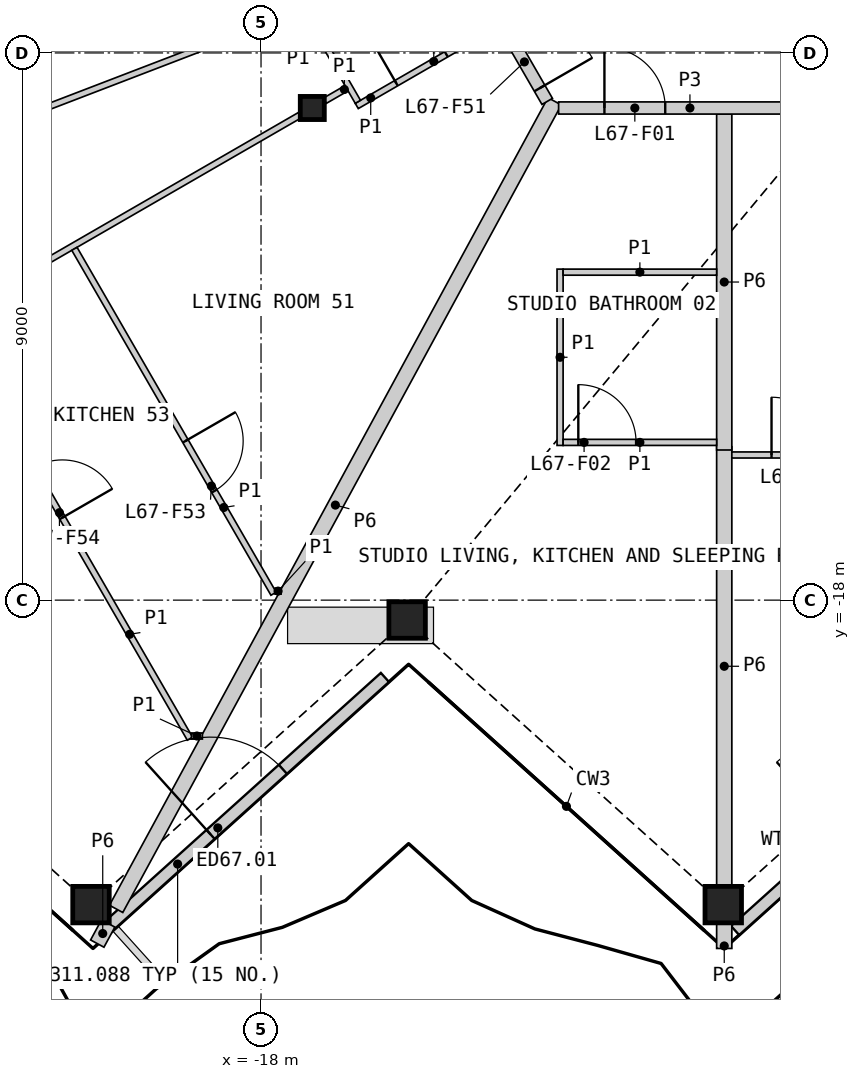
"""IFC4 building model, lengths in metres.
Left out: names, types, materials, properties, quantities, classifications, styles, units other than length and angle.
Written with IfcOpenShell. Run it as: python <this file> out.ifc"""

import sys

from ifc_helpers import new_model, si_unit, direction, frame, frame_2d, origin, origin_2d, place, context, subcontext, project, spatial, rectangle, hollow_rectangle, i_section, extrude, element, fill, save


model = new_model("IFC4")
c1 = context("Model", 3, precision=1e-05, world=origin(), true_north=direction((0.0, 1.0)))
c2 = subcontext(c1, "Body", "Model", "MODEL_VIEW")
j1 = project(units=[si_unit("LENGTHUNIT", "METRE"), si_unit("PLANEANGLEUNIT", "RADIAN")], contexts=[c1])
p1 = place(None, origin())
s1 = spatial("IfcSite", under=j1, at=p1, CompositionType="ELEMENT")
p2 = place(p1, origin())
s2 = spatial("IfcBuilding", under=s1, at=p2, CompositionType="ELEMENT")
p3 = place(p2, frame((0.0, 0.0, 308.6)))
s3 = spatial("IfcBuildingStorey", under=s2, at=p3, CompositionType="ELEMENT", Elevation=308.6)
for number, where, z_axis, x_axis in (
    (1, (-20.796, -23.008, 0.0), (0.0, 0.0, 1.0), (1.0, 0.0, 0.0)),
    (2, (-15.597, -18.327, 0.0), (0.0, 0.0, 1.0), (1.0, 0.0, 0.0)),
    (3, (-10.398, -23.008, 0.0), (0.0, 0.0, 1.0), (1.0, 0.0, 0.0)),
):
    element("IfcColumn", number, at=place(p3, frame(where, z_axis=z_axis, x_axis=x_axis)), inside=s3, PredefinedType="COLUMN", context=c2, shape_type="SweptSolid", body=[
        extrude(hollow_rectangle(XDim=0.6, YDim=0.6, WallThickness=0.04, at=origin_2d()), origin(), (0.0, 0.0, 1.0), 3.4),
    ])
p4 = place(p3, frame((-17.157, -9.906, 0.0), z_axis=(0.0, 0.0, 1.0), x_axis=(1.0, 0.0, 0.0)))
e4 = element("IfcColumn", 4, at=p4, inside=s3, PredefinedType="COLUMN", context=c2, shape_type="SweptSolid", body=[
    extrude(i_section(OverallWidth=0.396, OverallDepth=0.381, WebThickness=0.019, FlangeThickness=0.03, at=origin_2d()), origin(), (0.0, 0.0, 1.0), 3.4),
])
p5 = place(p3, frame((-20.508, -23.364, 0.0), z_axis=(0.0, 0.0, 1.0), x_axis=(0.743135364919, 0.669141113224, 0.0)))
e5 = element("IfcWall", 5, at=p5, inside=s3, PredefinedType="SOLIDWALL", context=c2, shape_type="SweptSolid", body=[
    extrude(rectangle(XDim=6.117, YDim=0.2, at=frame_2d((3.059, 0.0))), origin(), (0.0, 0.0, 1.0), 2.488),
])
p6 = place(p5, frame((2.259, 0.0, 0.0)))
e6 = element("IfcOpeningElement", 6, at=p6, cuts=e5, PredefinedType="OPENING", context=c2, shape_type="SweptSolid", body=[
    extrude(rectangle(XDim=1.6, YDim=2.25, at=frame_2d((0.8, 1.125))), frame((0.0, 0.11, 0.0), z_axis=(0.0, -1.0, 0.0), x_axis=(1.0, 0.0, 0.0)), (0.0, 0.0, 1.0), 0.22),
])
p7 = place(p3, frame((-10.203, -23.434, 0.0), z_axis=(0.0, 0.0, 1.0), x_axis=(0.74314582041, 0.669129501373, 0.0)))
e7 = element("IfcWall", 7, at=p7, inside=s3, PredefinedType="SOLIDWALL", context=c2, shape_type="SweptSolid", body=[
    extrude(rectangle(XDim=6.221, YDim=0.2, at=frame_2d((3.11, 0.0))), origin(), (0.0, 0.0, 1.0), 2.488),
])
p8 = place(p7, frame((2.362, 0.0, 0.0)))
e8 = element("IfcOpeningElement", 8, at=p8, cuts=e7, PredefinedType="OPENING", context=c2, shape_type="SweptSolid", body=[
    extrude(rectangle(XDim=1.6, YDim=2.25, at=frame_2d((0.8, 1.125))), frame((0.0, 0.11, 0.0), z_axis=(0.0, -1.0, 0.0), x_axis=(1.0, 0.0, 0.0)), (0.0, 0.0, 1.0), 0.22),
])
p9 = place(p3, frame((-20.383, -23.078, 0.0), z_axis=(0.0, 0.0, 1.0), x_axis=(0.477177412766, 0.878806984921, 0.0)))
e9 = element("IfcWall", 9, at=p9, inside=s3, PredefinedType="PARTITIONING", context=c2, shape_type="SweptSolid", body=[
    extrude(rectangle(XDim=15.114, YDim=0.25, at=frame_2d((7.557, 0.0))), origin(), (0.0, 0.0, 1.0), 2.33),
])
p10 = place(p3, frame((-10.382, -22.698, 0.0), z_axis=(0.0, 0.0, 1.0), x_axis=(0.0, 1.0, 0.0)))
e10 = element("IfcWall", 10, at=p10, inside=s3, PredefinedType="PARTITIONING", context=c2, shape_type="SweptSolid", body=[
    extrude(rectangle(XDim=7.22, YDim=0.25, at=frame_2d((3.61, 0.0))), origin(), (0.0, 0.0, 1.0), 2.33),
])
p11 = place(p3, frame((-10.382, -15.531, 0.0), z_axis=(0.0, 0.0, 1.0), x_axis=(0.0, 1.0, 0.0)))
e11 = element("IfcWall", 11, at=p11, inside=s3, PredefinedType="PARTITIONING", context=c2, shape_type="SweptSolid", body=[
    extrude(rectangle(XDim=5.525, YDim=0.25, at=frame_2d((2.762, 0.0))), origin(), (0.0, 0.0, 1.0), 2.33),
])
p12 = place(p3, frame((-13.106, -9.906, 0.0), z_axis=(0.0, 0.0, 1.0), x_axis=(1.0, 0.0, 0.0)))
e12 = element("IfcWall", 12, at=p12, inside=s3, PredefinedType="PARTITIONING", context=c2, shape_type="SweptSolid", body=[
    extrude(rectangle(XDim=4.32, YDim=0.2, at=frame_2d((2.16, 0.0))), origin(), (0.0, 0.0, 1.0), 3.1),
])
p13 = place(p12, frame((0.753, 0.0, 0.0)))
e13 = element("IfcOpeningElement", 13, at=p13, cuts=e12, PredefinedType="OPENING", context=c2, shape_type="SweptSolid", body=[
    extrude(rectangle(XDim=1.0, YDim=2.1, at=frame_2d((0.5, 1.05))), frame((0.0, 0.11, 0.0), z_axis=(0.0, -1.0, 0.0), x_axis=(1.0, 0.0, 0.0)), (0.0, 0.0, 1.0), 0.22),
])
p14 = place(p3, frame((-15.131, -6.614, 0.0), z_axis=(0.0, 0.0, 1.0), x_axis=(0.499967746641, -0.866044024469, 0.0)))
e14 = element("IfcWall", 14, at=p14, inside=s3, PredefinedType="PARTITIONING", context=c2, shape_type="SweptSolid", body=[
    extrude(rectangle(XDim=3.676, YDim=0.2, at=frame_2d((1.838, 0.0))), origin(), (0.0, 0.0, 1.0), 3.1),
])
p15 = place(p14, frame((2.426, 0.0, 0.0)))
e15 = element("IfcOpeningElement", 15, at=p15, cuts=e14, PredefinedType="OPENING", context=c2, shape_type="SweptSolid", body=[
    extrude(rectangle(XDim=1.0, YDim=2.1, at=frame_2d((0.5, 1.05))), frame((0.0, 0.11, 0.0), z_axis=(0.0, -1.0, 0.0), x_axis=(1.0, 0.0, 0.0)), (0.0, 0.0, 1.0), 0.22),
])
p16 = place(p3, frame((-10.382, -23.729, 0.0), z_axis=(0.0, 0.0, 1.0), x_axis=(0.0, 1.0, 0.0)))
e16 = element("IfcWall", 16, at=p16, inside=s3, PredefinedType="PARTITIONING", context=c2, shape_type="SweptSolid", body=[
    extrude(rectangle(XDim=0.411, YDim=0.25, at=frame_2d((0.206, 0.0))), origin(), (0.0, 0.0, 1.0), 2.33),
])
p17 = place(p3, frame((-20.693, -23.649, 0.0), z_axis=(0.0, 0.0, 1.0), x_axis=(0.477077538769, 0.878861207474, 0.0)))
e17 = element("IfcWall", 17, at=p17, inside=s3, PredefinedType="PARTITIONING", context=c2, shape_type="SweptSolid", body=[
    extrude(rectangle(XDim=0.376, YDim=0.25, at=frame_2d((0.188, 0.0))), origin(), (0.0, 0.0, 1.0), 2.33),
])
p18 = place(p3, frame((-29.479, -12.95, 0.0), z_axis=(0.0, 0.0, 1.0), x_axis=(0.933581523131, 0.358365092703, 0.0)))
e18 = element("IfcWall", 18, at=p18, inside=s3, PredefinedType="PARTITIONING", context=c2, shape_type="SweptSolid", body=[
    extrude(rectangle(XDim=13.005, YDim=0.1, at=frame_2d((6.502, 0.0))), origin(), (0.0, 0.0, 1.0), 2.33),
])
p19 = place(p18, frame((4.771, 0.0, 0.0)))
e19 = element("IfcOpeningElement", 19, at=p19, cuts=e18, PredefinedType="OPENING", context=c2, shape_type="SweptSolid", body=[
    extrude(rectangle(XDim=0.95, YDim=2.1, at=frame_2d((0.475, 1.05))), frame((0.0, 0.06, 0.0), z_axis=(0.0, -1.0, 0.0), x_axis=(1.0, 0.0, 0.0)), (0.0, 0.0, 1.0), 0.12),
])
p20 = place(p3, frame((-27.122, -15.659, 0.0), z_axis=(0.0, 0.0, 1.0), x_axis=(0.866021046153, 0.500007547564, 0.0)))
e20 = element("IfcWall", 20, at=p20, inside=s3, PredefinedType="PARTITIONING", context=c2, shape_type="SweptSolid", body=[
    extrude(rectangle(XDim=11.267, YDim=0.1, at=frame_2d((5.634, 0.0))), origin(), (0.0, 0.0, 1.0), 2.33),
])
p21 = place(p20, frame((1.452, 0.0, 0.0)))
e21 = element("IfcOpeningElement", 21, at=p21, cuts=e20, PredefinedType="OPENING", context=c2, shape_type="SweptSolid", body=[
    extrude(rectangle(XDim=0.95, YDim=2.1, at=frame_2d((0.475, 1.05))), frame((0.0, 0.06, 0.0), z_axis=(0.0, -1.0, 0.0), x_axis=(1.0, 0.0, 0.0)), (0.0, 0.0, 1.0), 0.12),
])
p22 = place(p3, frame((-10.257, -15.613, 0.0), z_axis=(0.0, 0.0, 1.0), x_axis=(1.0, 0.0, 0.0)))
e22 = element("IfcWall", 22, at=p22, inside=s3, PredefinedType="PARTITIONING", context=c2, shape_type="SweptSolid", body=[
    extrude(rectangle(XDim=10.207, YDim=0.1, at=frame_2d((5.104, 0.0))), origin(), (0.0, 0.0, 1.0), 2.33),
])
p23 = place(p22, frame((8.403, 0.0, 0.0)))
e23 = element("IfcOpeningElement", 23, at=p23, cuts=e22, PredefinedType="OPENING", context=c2, shape_type="SweptSolid", body=[
    extrude(rectangle(XDim=0.95, YDim=2.1, at=frame_2d((0.475, 1.05))), frame((0.0, 0.06, 0.0), z_axis=(0.0, -1.0, 0.0), x_axis=(1.0, 0.0, 0.0)), (0.0, 0.0, 1.0), 0.12),
])
p24 = place(p22, frame((0.653, 0.0, 0.0)))
e24 = element("IfcOpeningElement", 24, at=p24, cuts=e22, PredefinedType="OPENING", context=c2, shape_type="SweptSolid", body=[
    extrude(rectangle(XDim=0.95, YDim=2.1, at=frame_2d((0.475, 1.05))), frame((0.0, 0.06, 0.0), z_axis=(0.0, -1.0, 0.0), x_axis=(1.0, 0.0, 0.0)), (0.0, 0.0, 1.0), 0.12),
])
p25 = place(p3, frame((-23.133, -13.414, 0.0), z_axis=(0.0, 0.0, 1.0), x_axis=(0.500014841469, -0.866016834889, 0.0)))
e25 = element("IfcWall", 25, at=p25, inside=s3, PredefinedType="PARTITIONING", context=c2, shape_type="SweptSolid", body=[
    extrude(rectangle(XDim=7.927, YDim=0.1, at=frame_2d((3.963, 0.0))), origin(), (0.0, 0.0, 1.0), 2.33),
])
p26 = place(p25, frame((2.78, 0.0, 0.0)))
e26 = element("IfcOpeningElement", 26, at=p26, cuts=e25, PredefinedType="OPENING", context=c2, shape_type="SweptSolid", body=[
    extrude(rectangle(XDim=0.95, YDim=2.1, at=frame_2d((0.475, 1.05))), frame((0.0, 0.06, 0.0), z_axis=(0.0, -1.0, 0.0), x_axis=(1.0, 0.0, 0.0)), (0.0, 0.0, 1.0), 0.12),
])
p27 = place(p3, frame((-21.069, -12.222, 0.0), z_axis=(0.0, 0.0, 1.0), x_axis=(0.499991310556, -0.866030420579, 0.0)))
e27 = element("IfcWall", 27, at=p27, inside=s3, PredefinedType="PARTITIONING", context=c2, shape_type="SweptSolid", body=[
    extrude(rectangle(XDim=6.55, YDim=0.1, at=frame_2d((3.275, 0.0))), origin(), (0.0, 0.0, 1.0), 2.33),
])
p28 = place(p27, frame((3.65, 0.0, 0.0)))
e28 = element("IfcOpeningElement", 28, at=p28, cuts=e27, PredefinedType="OPENING", context=c2, shape_type="SweptSolid", body=[
    extrude(rectangle(XDim=0.95, YDim=2.1, at=frame_2d((0.475, 1.05))), frame((0.0, 0.06, 0.0), z_axis=(0.0, -1.0, 0.0), x_axis=(1.0, 0.0, 0.0)), (0.0, 0.0, 1.0), 0.12),
])
p29 = place(p3, frame((-13.082, -15.456, 0.0), z_axis=(0.0, 0.0, 1.0), x_axis=(0.0, 1.0, 0.0)))
e29 = element("IfcWall", 29, at=p29, inside=s3, PredefinedType="PARTITIONING", context=c2, shape_type="SweptSolid", body=[
    extrude(rectangle(XDim=2.9, YDim=0.1, at=frame_2d((1.45, 0.0))), origin(), (0.0, 0.0, 1.0), 2.33),
])
p30 = place(p3, frame((-16.426, -9.872, 0.0), z_axis=(0.0, 0.0, 1.0), x_axis=(0.866029095148, 0.499993606316, 0.0)))
e30 = element("IfcWall", 30, at=p30, inside=s3, PredefinedType="PARTITIONING", context=c2, shape_type="SweptSolid", body=[
    extrude(rectangle(XDim=2.65, YDim=0.1, at=frame_2d((1.325, 0.0))), origin(), (0.0, 0.0, 1.0), 2.33),
])
p31 = place(p30, frame((0.75, 0.0, 0.0)))
e31 = element("IfcOpeningElement", 31, at=p31, cuts=e30, PredefinedType="OPENING", context=c2, shape_type="SweptSolid", body=[
    extrude(rectangle(XDim=0.95, YDim=2.1, at=frame_2d((0.475, 1.05))), frame((0.0, 0.06, 0.0), z_axis=(0.0, -1.0, 0.0), x_axis=(1.0, 0.0, 0.0)), (0.0, 0.0, 1.0), 0.12),
])
p32 = place(p3, frame((-13.032, -12.606, 0.0), z_axis=(0.0, 0.0, 1.0), x_axis=(1.0, 0.0, 0.0)))
e32 = element("IfcWall", 32, at=p32, inside=s3, PredefinedType="PARTITIONING", context=c2, shape_type="SweptSolid", body=[
    extrude(rectangle(XDim=2.525, YDim=0.1, at=frame_2d((1.263, 0.0))), origin(), (0.0, 0.0, 1.0), 2.33),
])
p33 = place(p3, frame((-13.032, -15.406, 0.0), z_axis=(0.0, 0.0, 1.0), x_axis=(1.0, 0.0, 0.0)))
e33 = element("IfcWall", 33, at=p33, inside=s3, PredefinedType="PARTITIONING", context=c2, shape_type="SweptSolid", body=[
    extrude(rectangle(XDim=2.525, YDim=0.1, at=frame_2d((1.263, 0.0))), origin(), (0.0, 0.0, 1.0), 2.33),
])
p34 = place(p33, frame((0.25, 0.0, 0.0)))
e34 = element("IfcOpeningElement", 34, at=p34, cuts=e33, PredefinedType="OPENING", context=c2, shape_type="SweptSolid", body=[
    extrude(rectangle(XDim=0.95, YDim=2.1, at=frame_2d((0.475, 1.05))), frame((0.0, 0.06, 0.0), z_axis=(0.0, -1.0, 0.0), x_axis=(1.0, 0.0, 0.0)), (0.0, 0.0, 1.0), 0.12),
])
p35 = place(p3, frame((-17.507, -7.899, 0.0), z_axis=(0.0, 0.0, 1.0), x_axis=(0.499946605688, -0.86605622881, 0.0)))
e35 = element("IfcWall", 35, at=p35, inside=s3, PredefinedType="PARTITIONING", context=c2, shape_type="SweptSolid", body=[
    extrude(rectangle(XDim=2.2, YDim=0.1, at=frame_2d((1.1, 0.0))), origin(), (0.0, 0.0, 1.0), 2.33),
])
p36 = place(p3, frame((-16.949, -9.786, 0.0), z_axis=(0.0, 0.0, 1.0), x_axis=(0.866036909293, 0.499980071345, 0.0)))
e36 = element("IfcWall", 36, at=p36, inside=s3, PredefinedType="PARTITIONING", context=c2, shape_type="SweptSolid", body=[
    extrude(rectangle(XDim=0.41, YDim=0.1, at=frame_2d((0.205, 0.0))), origin(), (0.0, 0.0, 1.0), 2.33),
])
p37 = place(p3, frame((-19.145, -20.235, 0.0), z_axis=(0.0, 0.0, 1.0), x_axis=(1.0, 0.0, 0.0)))
e37 = element("IfcWall", 37, at=p37, inside=s3, PredefinedType="PARTITIONING", context=c2, shape_type="SweptSolid", body=[
    extrude(rectangle(XDim=0.18, YDim=0.1, at=frame_2d((0.09, 0.0))), origin(), (0.0, 0.0, 1.0), 2.33),
])
p38 = place(p3, frame((-17.769, -17.852, 0.0), z_axis=(0.0, 0.0, 1.0), x_axis=(1.0, 0.0, 0.0)))
e38 = element("IfcWall", 38, at=p38, inside=s3, PredefinedType="PARTITIONING", context=c2, shape_type="SweptSolid", body=[
    extrude(rectangle(XDim=0.098, YDim=0.1, at=frame_2d((0.049, 0.0))), origin(), (0.0, 0.0, 1.0), 2.33),
])
p39 = place(p6, origin())
e39 = element("IfcDoor", 39, at=p39, inside=s3, OperationType="DOUBLE_DOOR_SINGLE_SWING", PredefinedType="DOOR", context=c2, shape_type="SweptSolid", body=[
    extrude(rectangle(XDim=1.6, YDim=2.25, at=frame_2d((0.8, 1.125))), frame((0.0, 0.025, 0.0), z_axis=(0.0, -1.0, 0.0), x_axis=(1.0, 0.0, 0.0)), (0.0, 0.0, 1.0), 0.05),
])
fill(e6, e39)
p40 = place(p13, origin())
e40 = element("IfcDoor", 40, at=p40, inside=s3, OperationType="SINGLE_SWING_LEFT", PredefinedType="DOOR", context=c2, shape_type="SweptSolid", body=[
    extrude(rectangle(XDim=1.0, YDim=2.1, at=frame_2d((0.5, 1.05))), frame((0.0, 0.025, 0.0), z_axis=(0.0, -1.0, 0.0), x_axis=(1.0, 0.0, 0.0)), (0.0, 0.0, 1.0), 0.05),
])
fill(e13, e40)
p41 = place(p34, origin())
e41 = element("IfcDoor", 41, at=p41, inside=s3, OperationType="SINGLE_SWING_LEFT", PredefinedType="DOOR", context=c2, shape_type="SweptSolid", body=[
    extrude(rectangle(XDim=0.95, YDim=2.1, at=frame_2d((0.475, 1.05))), frame((0.0, 0.025, 0.0), z_axis=(0.0, -1.0, 0.0), x_axis=(1.0, 0.0, 0.0)), (0.0, 0.0, 1.0), 0.05),
])
fill(e34, e41)
p42 = place(p24, origin())
e42 = element("IfcDoor", 42, at=p42, inside=s3, OperationType="SINGLE_SWING_LEFT", PredefinedType="DOOR", context=c2, shape_type="SweptSolid", body=[
    extrude(rectangle(XDim=0.95, YDim=2.1, at=frame_2d((0.475, 1.05))), frame((0.0, 0.025, 0.0), z_axis=(0.0, -1.0, 0.0), x_axis=(1.0, 0.0, 0.0)), (0.0, 0.0, 1.0), 0.05),
])
fill(e24, e42)
p43 = place(p15, origin())
e43 = element("IfcDoor", 43, at=p43, inside=s3, OperationType="SINGLE_SWING_RIGHT", PredefinedType="DOOR", context=c2, shape_type="SweptSolid", body=[
    extrude(rectangle(XDim=1.0, YDim=2.1, at=frame_2d((0.5, 1.05))), frame((0.0, 0.025, 0.0), z_axis=(0.0, -1.0, 0.0), x_axis=(1.0, 0.0, 0.0)), (0.0, 0.0, 1.0), 0.05),
])
fill(e15, e43)
p44 = place(p31, origin())
e44 = element("IfcDoor", 44, at=p44, inside=s3, OperationType="SINGLE_SWING_LEFT", PredefinedType="DOOR", context=c2, shape_type="SweptSolid", body=[
    extrude(rectangle(XDim=0.95, YDim=2.1, at=frame_2d((0.475, 1.05))), frame((0.0, 0.025, 0.0), z_axis=(0.0, -1.0, 0.0), x_axis=(1.0, 0.0, 0.0)), (0.0, 0.0, 1.0), 0.05),
])
fill(e31, e44)
p45 = place(p28, origin())
e45 = element("IfcDoor", 45, at=p45, inside=s3, OperationType="SINGLE_SWING_LEFT", PredefinedType="DOOR", context=c2, shape_type="SweptSolid", body=[
    extrude(rectangle(XDim=0.95, YDim=2.1, at=frame_2d((0.475, 1.05))), frame((0.0, 0.025, 0.0), z_axis=(0.0, -1.0, 0.0), x_axis=(1.0, 0.0, 0.0)), (0.0, 0.0, 1.0), 0.05),
])
fill(e28, e45)
p46 = place(p26, origin())
e46 = element("IfcDoor", 46, at=p46, inside=s3, OperationType="SINGLE_SWING_RIGHT", PredefinedType="DOOR", context=c2, shape_type="SweptSolid", body=[
    extrude(rectangle(XDim=0.95, YDim=2.1, at=frame_2d((0.475, 1.05))), frame((0.0, 0.025, 0.0), z_axis=(0.0, -1.0, 0.0), x_axis=(1.0, 0.0, 0.0)), (0.0, 0.0, 1.0), 0.05),
])
fill(e26, e46)
save(model, sys.argv[1])
